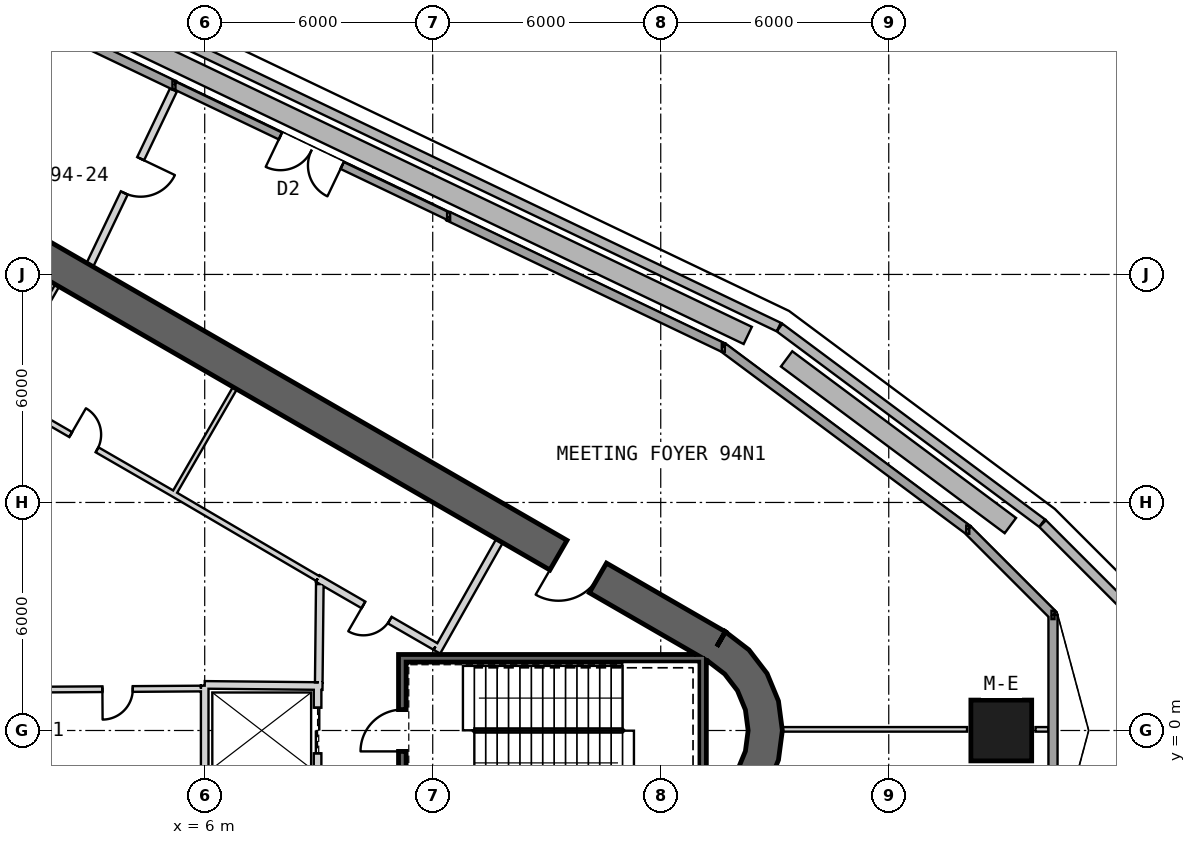
"""IFC4 building model, lengths in metres.
Left out: names, types, materials, properties, quantities, classifications, styles, units other than length and angle.
Written with IfcOpenShell. Run it as: python <this file> out.ifc"""

import sys

from ifc_helpers import new_model, si_unit, direction, frame, frame_2d, origin, origin_2d, place, context, subcontext, project, spatial, polyline, rectangle, outline, extrude, element, fill, save


model = new_model("IFC4")
c1 = context("Model", 3, precision=1e-05, world=origin(), true_north=direction((0.0, 1.0)))
c2 = subcontext(c1, "Body", "Model", "MODEL_VIEW")
j1 = project(units=[si_unit("LENGTHUNIT", "METRE"), si_unit("PLANEANGLEUNIT", "RADIAN")], contexts=[c1])
p1 = place(None, origin())
s1 = spatial("IfcSite", under=j1, at=p1, CompositionType="ELEMENT")
p2 = place(p1, origin())
s2 = spatial("IfcBuilding", under=s1, at=p2, CompositionType="ELEMENT")
p3 = place(p2, frame((0.0, 0.0, 415.3)))
s3 = spatial("IfcBuildingStorey", under=s2, at=p3, CompositionType="ELEMENT", Elevation=415.3)
p4 = place(p3, frame((26.961, 0.0, -0.25), z_axis=(0.0, 0.0, 1.0), x_axis=(1.0, 0.0, 0.0)))
e1 = element("IfcColumn", 1, at=p4, inside=s3, PredefinedType="COLUMN", context=c2, shape_type="SweptSolid", body=[
    extrude(rectangle(XDim=1.6, YDim=1.6, at=origin_2d()), origin(), (0.0, 0.0, 1.0), 5.0),
])
p5 = place(p3, frame((19.475, 2.208, 0.0), z_axis=(0.0, 0.0, 1.0), x_axis=(-0.866028369851, 0.499994862586, 0.0)))
e2 = element("IfcWall", 2, at=p5, inside=s3, PredefinedType="SHEAR", context=c2, shape_type="SweptSolid", body=[
    extrude(rectangle(XDim=31.523, YDim=0.9, at=frame_2d((15.762, 0.0))), origin(), (0.0, 0.0, 1.0), 5.0),
])
p6 = place(p5, frame((3.612, 0.0, 0.0)))
e3 = element("IfcOpeningElement", 3, at=p6, cuts=e2, PredefinedType="OPENING", context=c2, shape_type="SweptSolid", body=[
    extrude(rectangle(XDim=1.2, YDim=2.4, at=frame_2d((0.6, 1.2))), frame((0.0, 0.46, 0.0), z_axis=(0.0, -1.0, 0.0), x_axis=(1.0, 0.0, 0.0)), (0.0, 0.0, 1.0), 0.92),
])
p7 = place(p5, frame((26.712, 0.0, 0.0)))
e4 = element("IfcOpeningElement", 4, at=p7, cuts=e2, PredefinedType="OPENING", context=c2, shape_type="SweptSolid", body=[
    extrude(rectangle(XDim=1.2, YDim=2.4, at=frame_2d((0.6, 1.2))), frame((0.0, 0.46, 0.0), z_axis=(0.0, -1.0, 0.0), x_axis=(1.0, 0.0, 0.0)), (0.0, 0.0, 1.0), 0.92),
])
p8 = place(p3, origin())
e5 = element("IfcWall", 5, at=p8, inside=s3, PredefinedType="SHEAR", context=c2, shape_type="SweptSolid", body=[
    extrude(outline(polyline([(19.7, -2.598), (20.321, -2.121), (20.798, -1.5), (21.098, -0.777), (21.2, 0.0), (21.098, 0.777), (20.798, 1.5), (20.321, 2.121), (19.7, 2.598), (19.25, 1.819), (19.685, 1.485), (20.019, 1.05), (20.229, 0.543), (20.3, 0.0), (20.229, -0.543), (20.019, -1.05), (19.685, -1.485), (19.25, -1.819), (19.7, -2.598)])), origin(), (0.0, 0.0, 1.0), 5.0),
])
p9 = place(p3, frame((26.079, 5.284, 0.0), z_axis=(0.0, 0.0, 1.0), x_axis=(-0.801990053173, 0.597337387589, 0.0)))
e6 = element("IfcWall", 6, at=p9, inside=s3, PredefinedType="SOLIDWALL", context=c2, shape_type="SweptSolid", body=[
    extrude(rectangle(XDim=8.02, YDim=0.24, at=frame_2d((4.01, 0.0))), origin(), (0.0, 0.0, 1.0), 4.75),
])
p10 = place(p3, frame((19.647, 10.075, 0.0), z_axis=(0.0, 0.0, 1.0), x_axis=(-0.902321568676, 0.431063552974, 0.0)))
e7 = element("IfcWall", 7, at=p10, inside=s3, PredefinedType="SOLIDWALL", context=c2, shape_type="SweptSolid", body=[
    extrude(rectangle(XDim=8.024, YDim=0.24, at=frame_2d((4.012, 0.0))), origin(), (0.0, 0.0, 1.0), 4.75),
])
p11 = place(p3, frame((5.203, 16.976, 0.0), z_axis=(0.0, 0.0, 1.0), x_axis=(-0.902309733551, 0.431088325913, 0.0)))
e8 = element("IfcWall", 8, at=p11, inside=s3, PredefinedType="SOLIDWALL", context=c2, shape_type="SweptSolid", body=[
    extrude(rectangle(XDim=8.024, YDim=0.24, at=frame_2d((4.012, 0.0))), origin(), (0.0, 0.0, 1.0), 4.75),
])
p12 = place(p3, frame((28.322, -3.041, 0.0), z_axis=(0.0, 0.0, 1.0), x_axis=(0.0, 1.0, 0.0)))
e9 = element("IfcWall", 9, at=p12, inside=s3, PredefinedType="SOLIDWALL", context=c2, shape_type="SweptSolid", body=[
    extrude(rectangle(XDim=6.083, YDim=0.24, at=frame_2d((3.041, 0.0))), origin(), (0.0, 0.0, 1.0), 4.75),
])
p13 = place(p3, frame((28.322, 3.041, 0.0), z_axis=(0.0, 0.0, 1.0), x_axis=(-0.707106781187, 0.707106781187, 0.0)))
e10 = element("IfcWall", 10, at=p13, inside=s3, PredefinedType="SOLIDWALL", context=c2, shape_type="SweptSolid", body=[
    extrude(rectangle(XDim=3.172, YDim=0.24, at=frame_2d((1.586, 0.0))), origin(), (0.0, 0.0, 1.0), 4.75),
])
p14 = place(p3, frame((12.407, 13.534, 0.0), z_axis=(0.0, 0.0, 1.0), x_axis=(-0.902318881861, 0.431069177091, 0.0)))
e11 = element("IfcWall", 11, at=p14, inside=s3, PredefinedType="SOLIDWALL", context=c2, shape_type="SweptSolid", body=[
    extrude(rectangle(XDim=7.984, YDim=0.2, at=frame_2d((3.992, 0.0))), origin(), (0.0, 0.0, 1.0), 4.75),
])
p15 = place(p14, frame((3.092, 0.0, 0.0)))
e12 = element("IfcOpeningElement", 12, at=p15, cuts=e11, PredefinedType="OPENING", context=c2, shape_type="SweptSolid", body=[
    extrude(rectangle(XDim=1.8, YDim=2.4, at=frame_2d((0.9, 1.2))), frame((0.0, 0.11, 0.0), z_axis=(0.0, -1.0, 0.0), x_axis=(1.0, 0.0, 0.0)), (0.0, 0.0, 1.0), 0.22),
])
p16 = place(p3, frame((28.049, 5.444, 0.04), z_axis=(0.0, 0.0, 1.0), x_axis=(0.707106781187, -0.707106781187, 0.0)))
e13 = element("IfcWall", 13, at=p16, inside=s3, PredefinedType="PARAPET", context=c2, shape_type="SweptSolid", body=[
    extrude(rectangle(XDim=3.272, YDim=0.25, at=frame_2d((1.636, 0.0))), origin(), (0.0, 0.0, 1.0), 1.2),
])
p17 = place(p3, frame((-2.391, 21.84, 0.04), z_axis=(0.0, 0.0, 1.0), x_axis=(0.902315972125, -0.43107526773, 0.0)))
e14 = element("IfcWall", 14, at=p17, inside=s3, PredefinedType="PARAPET", context=c2, shape_type="SweptSolid", body=[
    extrude(rectangle(XDim=26.04, YDim=0.25, at=frame_2d((13.02, 0.0))), origin(), (0.0, 0.0, 1.0), 1.2),
])
p18 = place(p3, frame((21.126, 10.602, 0.04), z_axis=(0.0, 0.0, 1.0), x_axis=(0.801988513361, -0.597339454948, 0.0)))
e15 = element("IfcWall", 15, at=p18, inside=s3, PredefinedType="PARAPET", context=c2, shape_type="SweptSolid", body=[
    extrude(rectangle(XDim=8.615, YDim=0.25, at=frame_2d((4.307, 0.0))), origin(), (0.0, 0.0, 1.0), 1.2),
])
p19 = place(p3, frame((-2.146, 21.113, 0.04), z_axis=(0.0, 0.0, 1.0), x_axis=(0.902316759071, -0.43107362051, 0.0)))
e16 = element("IfcWall", 16, at=p19, inside=s3, PredefinedType="PARAPET", context=c2, shape_type="SweptSolid", body=[
    extrude(rectangle(XDim=24.864, YDim=0.5, at=frame_2d((12.432, 0.0))), origin(), (0.0, 0.0, 1.0), 0.6),
])
p20 = place(p3, frame((21.312, 9.778, 0.04), z_axis=(0.0, 0.0, 1.0), x_axis=(0.80198277928, -0.597347153453, 0.0)))
e17 = element("IfcWall", 17, at=p20, inside=s3, PredefinedType="PARAPET", context=c2, shape_type="SweptSolid", body=[
    extrude(rectangle(XDim=7.342, YDim=0.5, at=frame_2d((3.671, 0.0))), origin(), (0.0, 0.0, 1.0), 0.6),
])
p21 = place(p3, frame((19.2, 1.9, -0.25), z_axis=(0.0, 0.0, 1.0), x_axis=(-1.0, 0.0, 0.0)))
e18 = element("IfcWall", 18, at=p21, inside=s3, PredefinedType="SHEAR", context=c2, shape_type="SweptSolid", body=[
    extrude(rectangle(XDim=8.1, YDim=0.2, at=frame_2d((4.05, 0.0))), origin(), (0.0, 0.0, 1.0), 5.0),
])
p22 = place(p3, frame((19.1, -2.0, -0.25), z_axis=(0.0, 0.0, 1.0), x_axis=(0.0, 1.0, 0.0)))
e19 = element("IfcWall", 19, at=p22, inside=s3, PredefinedType="SHEAR", context=c2, shape_type="SweptSolid", body=[
    extrude(rectangle(XDim=3.8, YDim=0.2, at=frame_2d((1.9, 0.0))), origin(), (0.0, 0.0, 1.0), 5.0),
])
p23 = place(p3, frame((11.2, -1.8, -0.25), z_axis=(0.0, 0.0, 1.0), x_axis=(0.0, 1.0, 0.0)))
e20 = element("IfcWall", 20, at=p23, inside=s3, PredefinedType="SHEAR", context=c2, shape_type="SweptSolid", body=[
    extrude(rectangle(XDim=3.6, YDim=0.2, at=frame_2d((1.8, 0.0))), origin(), (0.0, 0.0, 1.0), 5.0),
])
p24 = place(p23, frame((1.25, 0.0, 0.25)))
e21 = element("IfcOpeningElement", 21, at=p24, cuts=e20, PredefinedType="OPENING", context=c2, shape_type="SweptSolid", body=[
    extrude(rectangle(XDim=1.1, YDim=2.1, at=frame_2d((0.55, 1.05))), frame((0.0, 0.11, 0.0), z_axis=(0.0, -1.0, 0.0), x_axis=(1.0, 0.0, 0.0)), (0.0, 0.0, 1.0), 0.22),
])
p25 = place(p3, frame((8.97, 1.2, 0.0), z_axis=(0.0, 0.0, 1.0), x_axis=(0.0, -1.0, 0.0)))
e22 = element("IfcWall", 22, at=p25, inside=s3, PredefinedType="PLUMBINGWALL", context=c2, shape_type="SweptSolid", body=[
    extrude(rectangle(XDim=2.4, YDim=0.2, at=frame_2d((1.2, 0.0))), origin(), (0.0, 0.0, 1.0), 4.75),
])
p26 = place(p25, frame((0.6, 0.0, 0.0)))
e23 = element("IfcOpeningElement", 23, at=p26, cuts=e22, PredefinedType="OPENING", context=c2, shape_type="SweptSolid", body=[
    extrude(rectangle(XDim=1.2, YDim=2.4, at=frame_2d((0.6, 1.2))), frame((0.0, 0.11, 0.0), z_axis=(0.0, -1.0, 0.0), x_axis=(1.0, 0.0, 0.0)), (0.0, 0.0, 1.0), 0.22),
])
p27 = place(p3, frame((6.0, 1.2, 0.0), z_axis=(0.0, 0.0, 1.0), x_axis=(0.999949988, -0.010001074852, 0.0)))
e24 = element("IfcWall", 24, at=p27, inside=s3, PredefinedType="PLUMBINGWALL", context=c2, shape_type="SweptSolid", body=[
    extrude(rectangle(XDim=3.1, YDim=0.2, at=frame_2d((1.55, 0.0))), origin(), (0.0, 0.0, 1.0), 4.75),
])
p28 = place(p3, frame((6.0, -1.1, 0.0), z_axis=(0.0, 0.0, 1.0), x_axis=(0.0, 1.0, 0.0)))
e25 = element("IfcWall", 25, at=p28, inside=s3, PredefinedType="PLUMBINGWALL", context=c2, shape_type="SweptSolid", body=[
    extrude(rectangle(XDim=2.28, YDim=0.2, at=frame_2d((1.14, 0.0))), origin(), (0.0, 0.0, 1.0), 4.75),
])
p29 = place(p3, frame((6.795, 9.01, 0.0), z_axis=(0.0, 0.0, 1.0), x_axis=(-0.499984717929, -0.866034226713, 0.0)))
e26 = element("IfcWall", 26, at=p29, inside=s3, PredefinedType="PARTITIONING", context=c2, shape_type="SweptSolid", body=[
    extrude(rectangle(XDim=3.25, YDim=0.12, at=frame_2d((1.625, 0.0))), origin(), (0.0, 0.0, 1.0), 4.75),
])
p30 = place(p3, frame((12.11, 2.073, 0.0), z_axis=(0.0, 0.0, 1.0), x_axis=(0.49196600604, 0.870614408852, 0.0)))
e27 = element("IfcWall", 27, at=p30, inside=s3, PredefinedType="PARTITIONING", context=c2, shape_type="SweptSolid", body=[
    extrude(rectangle(XDim=3.35, YDim=0.2, at=frame_2d((1.675, 0.0))), origin(), (0.0, 0.0, 1.0), 4.75),
])
p31 = place(p3, frame((8.974, 3.999, 0.0), z_axis=(0.0, 0.0, 1.0), x_axis=(0.86601284211, -0.500021756827, 0.0)))
e28 = element("IfcWall", 28, at=p31, inside=s3, PredefinedType="PARTITIONING", context=c2, shape_type="SweptSolid", body=[
    extrude(rectangle(XDim=3.577, YDim=0.2, at=frame_2d((1.789, 0.0))), origin(), (0.0, 0.0, 1.0), 4.75),
])
p32 = place(p31, frame((1.389, 0.0, 0.0)))
e29 = element("IfcOpeningElement", 29, at=p32, cuts=e28, PredefinedType="OPENING", context=c2, shape_type="SweptSolid", body=[
    extrude(rectangle(XDim=0.8, YDim=2.1, at=frame_2d((0.4, 1.05))), frame((0.0, 0.11, 0.0), z_axis=(0.0, -1.0, 0.0), x_axis=(1.0, 0.0, 0.0)), (0.0, 0.0, 1.0), 0.22),
])
p33 = place(p3, frame((8.974, 3.999, 0.0), z_axis=(0.0, 0.0, 1.0), x_axis=(-0.862665579, 0.505774751059, 0.0)))
e30 = element("IfcWall", 30, at=p33, inside=s3, PredefinedType="PLUMBINGWALL", context=c2, shape_type="SweptSolid", body=[
    extrude(rectangle(XDim=4.423, YDim=0.15, at=frame_2d((2.211, 0.0))), origin(), (0.0, 0.0, 1.0), 4.75),
])
p34 = place(p3, frame((2.119, 11.709, 0.0), z_axis=(0.0, 0.0, 1.0), x_axis=(-0.500017246033, -0.866015446554, 0.0)))
e31 = element("IfcWall", 31, at=p34, inside=s3, PredefinedType="PARTITIONING", context=c2, shape_type="SweptSolid", body=[
    extrude(rectangle(XDim=3.25, YDim=0.12, at=frame_2d((1.625, 0.0))), origin(), (0.0, 0.0, 1.0), 4.75),
])
p35 = place(p34, frame((1.225, 0.0, 0.0)))
e32 = element("IfcOpeningElement", 32, at=p35, cuts=e31, PredefinedType="OPENING", context=c2, shape_type="SweptSolid", body=[
    extrude(rectangle(XDim=0.8, YDim=2.1, at=frame_2d((0.4, 1.05))), frame((0.0, 0.07, 0.0), z_axis=(0.0, -1.0, 0.0), x_axis=(1.0, 0.0, 0.0)), (0.0, 0.0, 1.0), 0.14),
])
p36 = place(p3, frame((5.159, 6.236, 0.0), z_axis=(0.0, 0.0, 1.0), x_axis=(-0.866028230842, 0.499995103361, 0.0)))
e33 = element("IfcWall", 33, at=p36, inside=s3, PredefinedType="PLUMBINGWALL", context=c2, shape_type="SweptSolid", body=[
    extrude(rectangle(XDim=5.4, YDim=0.15, at=frame_2d((2.7, 0.0))), origin(), (0.0, 0.0, 1.0), 4.75),
])
p37 = place(p36, frame((2.3, 0.0, 0.0)))
e34 = element("IfcOpeningElement", 34, at=p37, cuts=e33, PredefinedType="OPENING", context=c2, shape_type="SweptSolid", body=[
    extrude(rectangle(XDim=0.8, YDim=2.1, at=frame_2d((0.4, 1.05))), frame((0.0, 0.085, 0.0), z_axis=(0.0, -1.0, 0.0), x_axis=(1.0, 0.0, 0.0)), (0.0, 0.0, 1.0), 0.17),
])
p38 = place(p3, frame((9.001, 1.27, 0.0), z_axis=(0.0, 0.0, 1.0), x_axis=(0.010780534828, 0.999941888346, 0.0)))
e35 = element("IfcWall", 35, at=p38, inside=s3, PredefinedType="PARTITIONING", context=c2, shape_type="SweptSolid", body=[
    extrude(rectangle(XDim=2.582, YDim=0.2, at=frame_2d((1.291, 0.0))), origin(), (0.0, 0.0, 1.0), 4.75),
])
p39 = place(p3, frame((1.388, 1.074, 0.0), z_axis=(0.0, 0.0, 1.0), x_axis=(0.99997856967, 0.006546770205, 0.0)))
e36 = element("IfcWall", 36, at=p39, inside=s3, PredefinedType="PLUMBINGWALL", context=c2, shape_type="SweptSolid", body=[
    extrude(rectangle(XDim=4.512, YDim=0.15, at=frame_2d((2.256, 0.0))), origin(), (0.0, 0.0, 1.0), 4.75),
])
p40 = place(p39, frame((1.92, 0.0, 0.0)))
e37 = element("IfcOpeningElement", 37, at=p40, cuts=e36, PredefinedType="OPENING", context=c2, shape_type="SweptSolid", body=[
    extrude(rectangle(XDim=0.8, YDim=2.1, at=frame_2d((0.4, 1.05))), frame((0.0, 0.085, 0.0), z_axis=(0.0, -1.0, 0.0), x_axis=(1.0, 0.0, 0.0)), (0.0, 0.0, 1.0), 0.17),
])
p41 = place(p3, frame((5.176, 16.85, 0.0), z_axis=(0.0, 0.0, 1.0), x_axis=(-0.431140150859, -0.902284971789, 0.0)))
e38 = element("IfcWall", 38, at=p41, inside=s3, PredefinedType="PARTITIONING", context=c2, shape_type="SweptSolid", body=[
    extrude(rectangle(XDim=5.096, YDim=0.2, at=frame_2d((2.548, 0.0))), origin(), (0.0, 0.0, 1.0), 4.75),
])
p42 = place(p41, frame((2.0, 0.0, 0.0)))
e39 = element("IfcOpeningElement", 39, at=p42, cuts=e38, PredefinedType="OPENING", context=c2, shape_type="SweptSolid", body=[
    extrude(rectangle(XDim=1.0, YDim=2.1, at=frame_2d((0.5, 1.05))), frame((0.0, 0.11, 0.0), z_axis=(0.0, -1.0, 0.0), x_axis=(1.0, 0.0, 0.0)), (0.0, 0.0, 1.0), 0.22),
])
p43 = place(p3, frame((21.046, 0.03, 0.0), z_axis=(0.0, 0.0, 1.0), x_axis=(1.0, 0.0, 0.0)))
e40 = element("IfcWall", 40, at=p43, inside=s3, PredefinedType="PARTITIONING", context=c2, shape_type="SweptSolid", body=[
    extrude(rectangle(XDim=5.015, YDim=0.12, at=frame_2d((2.507, 0.0))), origin(), (0.0, 0.0, 1.0), 2.52),
])
p44 = place(p3, frame((27.861, 0.03, 0.0), z_axis=(0.0, 0.0, 1.0), x_axis=(1.0, 0.0, 0.0)))
e41 = element("IfcWall", 41, at=p44, inside=s3, PredefinedType="PARTITIONING", context=c2, shape_type="SweptSolid", body=[
    extrude(rectangle(XDim=0.341, YDim=0.12, at=frame_2d((0.17, 0.0))), origin(), (0.0, 0.0, 1.0), 4.75),
])
p45 = place(p15, frame((1.8, 0.0, 0.0), z_axis=(0.0, 0.0, 1.0), x_axis=(-1.0, 0.0, 0.0)))
e42 = element("IfcDoor", 42, at=p45, inside=s3, OperationType="SINGLE_SWING_RIGHT", PredefinedType="DOOR", context=c2, shape_type="SweptSolid", body=[
    extrude(rectangle(XDim=1.8, YDim=2.4, at=frame_2d((0.9, 1.2))), frame((0.0, 0.025, 0.0), z_axis=(0.0, -1.0, 0.0), x_axis=(1.0, 0.0, 0.0)), (0.0, 0.0, 1.0), 0.05),
])
fill(e12, e42)
p46 = place(p24, origin())
e43 = element("IfcDoor", 43, at=p46, inside=s3, OperationType="SINGLE_SWING_LEFT", PredefinedType="USERDEFINED", context=c2, shape_type="SweptSolid", body=[
    extrude(rectangle(XDim=1.1, YDim=2.1, at=frame_2d((0.55, 1.05))), frame((0.0, 0.025, 0.0), z_axis=(0.0, -1.0, 0.0), x_axis=(1.0, 0.0, 0.0)), (0.0, 0.0, 1.0), 0.05),
])
fill(e21, e43)
p47 = place(p26, origin())
e44 = element("IfcDoor", 44, at=p47, inside=s3, OperationType="SLIDING_TO_LEFT", PredefinedType="USERDEFINED", context=c2, shape_type="SweptSolid", body=[
    extrude(rectangle(XDim=1.2, YDim=2.4, at=frame_2d((0.6, 1.2))), frame((0.0, 0.025, 0.0), z_axis=(0.0, -1.0, 0.0), x_axis=(1.0, 0.0, 0.0)), (0.0, 0.0, 1.0), 0.05),
])
fill(e23, e44)
p48 = place(p40, origin())
e45 = element("IfcDoor", 45, at=p48, inside=s3, OperationType="SINGLE_SWING_LEFT", PredefinedType="USERDEFINED", context=c2, shape_type="SweptSolid", body=[
    extrude(rectangle(XDim=0.8, YDim=2.1, at=frame_2d((0.4, 1.05))), frame((0.0, 0.025, 0.0), z_axis=(0.0, -1.0, 0.0), x_axis=(1.0, 0.0, 0.0)), (0.0, 0.0, 1.0), 0.05),
])
fill(e37, e45)
p49 = place(p32, origin())
e46 = element("IfcDoor", 46, at=p49, inside=s3, OperationType="SINGLE_SWING_LEFT", PredefinedType="USERDEFINED", context=c2, shape_type="SweptSolid", body=[
    extrude(rectangle(XDim=0.8, YDim=2.1, at=frame_2d((0.4, 1.05))), frame((0.0, 0.025, 0.0), z_axis=(0.0, -1.0, 0.0), x_axis=(1.0, 0.0, 0.0)), (0.0, 0.0, 1.0), 0.05),
])
fill(e29, e46)
p50 = place(p37, origin())
e47 = element("IfcDoor", 47, at=p50, inside=s3, OperationType="SINGLE_SWING_RIGHT", PredefinedType="USERDEFINED", context=c2, shape_type="SweptSolid", body=[
    extrude(rectangle(XDim=0.8, YDim=2.1, at=frame_2d((0.4, 1.05))), frame((0.0, 0.025, 0.0), z_axis=(0.0, -1.0, 0.0), x_axis=(1.0, 0.0, 0.0)), (0.0, 0.0, 1.0), 0.05),
])
fill(e34, e47)
p51 = place(p42, origin())
e48 = element("IfcDoor", 48, at=p51, inside=s3, OperationType="SINGLE_SWING_LEFT", PredefinedType="USERDEFINED", context=c2, shape_type="SweptSolid", body=[
    extrude(rectangle(XDim=1.0, YDim=2.1, at=frame_2d((0.5, 1.05))), frame((0.0, 0.025, 0.0), z_axis=(0.0, -1.0, 0.0), x_axis=(1.0, 0.0, 0.0)), (0.0, 0.0, 1.0), 0.05),
])
fill(e39, e48)
p52 = place(p6, origin())
e49 = element("IfcDoor", 49, at=p52, inside=s3, OperationType="SINGLE_SWING_RIGHT", PredefinedType="USERDEFINED", context=c2, shape_type="SweptSolid", body=[
    extrude(rectangle(XDim=1.2, YDim=2.4, at=frame_2d((0.6, 1.2))), frame((0.0, 0.025, 0.0), z_axis=(0.0, -1.0, 0.0), x_axis=(1.0, 0.0, 0.0)), (0.0, 0.0, 1.0), 0.05),
])
fill(e3, e49)
save(model, sys.argv[1])
